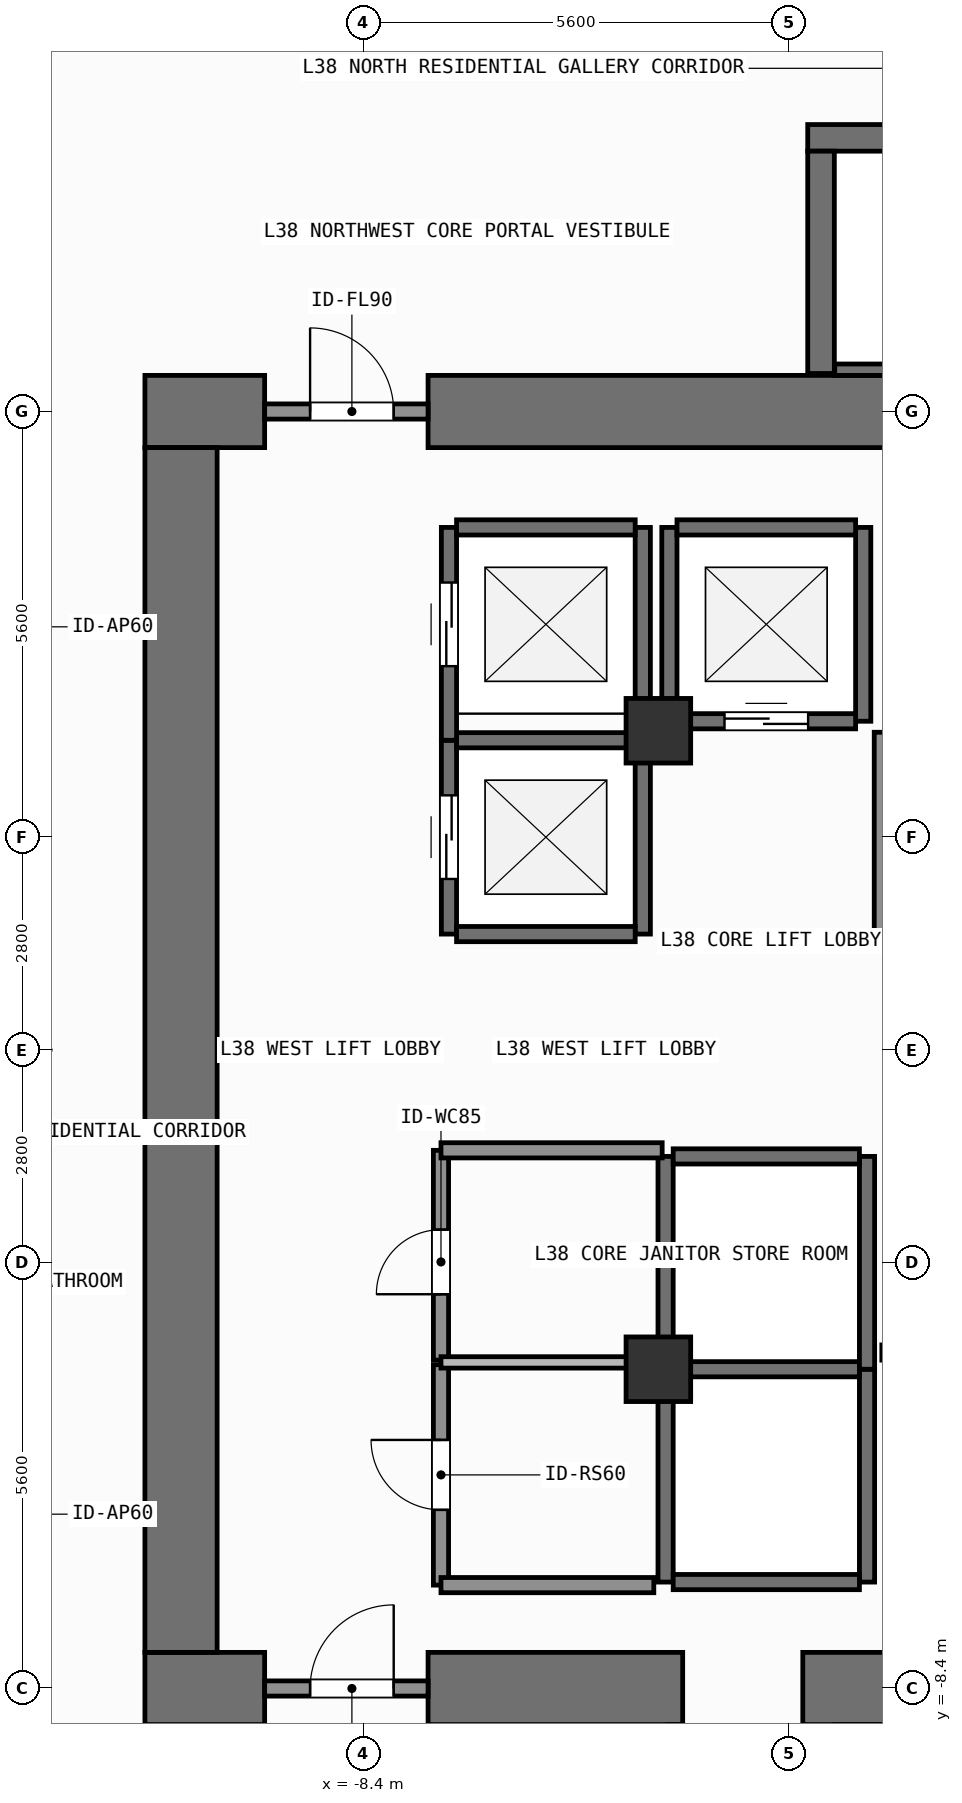
"""IFC4 building model, lengths in metres.
Left out: names, types, materials, properties, quantities, classifications, styles, units other than length and angle.
Written with IfcOpenShell. Run it as: python <this file> out.ifc"""

import sys

from ifc_helpers import new_model, si_unit, direction, frame, frame_2d, origin, origin_2d, place, context, subcontext, project, spatial, rectangle, extrude, element, fill, save


model = new_model("IFC4")
c1 = context("Model", 3, precision=1e-05, world=origin(), true_north=direction((0.0, 1.0)))
c2 = subcontext(c1, "Body", "Model", "MODEL_VIEW")
j1 = project(units=[si_unit("LENGTHUNIT", "METRE"), si_unit("PLANEANGLEUNIT", "RADIAN")], contexts=[c1])
p1 = place(None, origin())
s1 = spatial("IfcSite", under=j1, at=p1, CompositionType="ELEMENT")
p2 = place(p1, origin())
s2 = spatial("IfcBuilding", under=s1, at=p2, CompositionType="ELEMENT")
p3 = place(p2, frame((0.0, 0.0, 152.4)))
s3 = spatial("IfcBuildingStorey", under=s2, at=p3, CompositionType="ELEMENT", Elevation=152.4)
p4 = place(p3, frame((-11.275, -8.4, 0.0), z_axis=(0.0, 0.0, 1.0), x_axis=(1.0, 0.0, 0.0)))
e1 = element("IfcWall", 1, at=p4, inside=s3, PredefinedType="SHEAR", context=c2, shape_type="SweptSolid", body=[
    extrude(rectangle(XDim=1.575, YDim=0.95, at=frame_2d((0.788, 0.0))), origin(), (0.0, 0.0, 1.0), 3.9),
])
p5 = place(p3, frame((-7.55, -8.4, 0.0), z_axis=(0.0, 0.0, 1.0), x_axis=(1.0, 0.0, 0.0)))
e2 = element("IfcWall", 2, at=p5, inside=s3, PredefinedType="SHEAR", context=c2, shape_type="SweptSolid", body=[
    extrude(rectangle(XDim=3.35, YDim=0.95, at=frame_2d((1.675, 0.0))), origin(), (0.0, 0.0, 1.0), 3.9),
])
p6 = place(p3, frame((-2.62, -8.4, 0.0), z_axis=(0.0, 0.0, 1.0), x_axis=(1.0, 0.0, 0.0)))
e3 = element("IfcWall", 3, at=p6, inside=s3, PredefinedType="SHEAR", context=c2, shape_type="SweptSolid", body=[
    extrude(rectangle(XDim=7.27, YDim=0.95, at=frame_2d((3.635, 0.0))), origin(), (0.0, 0.0, 1.0), 3.9),
])
p7 = place(p3, frame((-11.275, 8.4, 0.0), z_axis=(0.0, 0.0, 1.0), x_axis=(1.0, 0.0, 0.0)))
e4 = element("IfcWall", 4, at=p7, inside=s3, PredefinedType="SHEAR", context=c2, shape_type="SweptSolid", body=[
    extrude(rectangle(XDim=1.575, YDim=0.95, at=frame_2d((0.788, 0.0))), origin(), (0.0, 0.0, 1.0), 3.9),
])
p8 = place(p3, frame((-7.55, 8.4, 0.0), z_axis=(0.0, 0.0, 1.0), x_axis=(1.0, 0.0, 0.0)))
e5 = element("IfcWall", 5, at=p8, inside=s3, PredefinedType="SHEAR", context=c2, shape_type="SweptSolid", body=[
    extrude(rectangle(XDim=16.425, YDim=0.95, at=frame_2d((8.212, 0.0))), origin(), (0.0, 0.0, 1.0), 3.9),
])
p9 = place(p3, frame((-10.8, -7.925, 0.0), z_axis=(0.0, 0.0, 1.0), x_axis=(0.0, 1.0, 0.0)))
e6 = element("IfcWall", 6, at=p9, inside=s3, PredefinedType="SHEAR", context=c2, shape_type="SweptSolid", body=[
    extrude(rectangle(XDim=15.85, YDim=0.95, at=frame_2d((7.925, 0.0))), origin(), (0.0, 0.0, 1.0), 3.9),
])
p10 = place(p3, frame((-2.555, 12.0, 0.0), z_axis=(0.0, 0.0, 1.0), x_axis=(1.0, 0.0, 0.0)))
e7 = element("IfcWall", 7, at=p10, inside=s3, PredefinedType="SHEAR", context=c2, shape_type="SweptSolid", body=[
    extrude(rectangle(XDim=7.31, YDim=0.35, at=frame_2d((3.655, 0.0))), origin(), (0.0, 0.0, 1.0), 3.9),
])
p11 = place(p3, frame((-2.2, 8.95, 0.0), z_axis=(0.0, 0.0, 1.0), x_axis=(1.0, 0.0, 0.0)))
e8 = element("IfcWall", 8, at=p11, inside=s3, PredefinedType="SHEAR", context=c2, shape_type="SweptSolid", body=[
    extrude(rectangle(XDim=6.6, YDim=0.15, at=frame_2d((3.3, 0.0))), origin(), (0.0, 0.0, 1.0), 3.9),
])
p12 = place(p3, frame((-2.38, 8.9, 0.0), z_axis=(0.0, 0.0, 1.0), x_axis=(0.0, 1.0, 0.0)))
e9 = element("IfcWall", 9, at=p12, inside=s3, PredefinedType="SHEAR", context=c2, shape_type="SweptSolid", body=[
    extrude(rectangle(XDim=2.925, YDim=0.35, at=frame_2d((1.462, 0.0))), origin(), (0.0, 0.0, 1.0), 3.9),
])
for number, where, z_axis, x_axis in (
    (10, (-4.52, -4.2, 0.0), (0.0, 0.0, 1.0), (1.0, 0.0, 0.0)),
    (11, (-4.52, 4.2, 0.0), (0.0, 0.0, 1.0), (1.0, 0.0, 0.0)),
):
    element("IfcColumn", number, at=place(p3, frame(where, z_axis=z_axis, x_axis=x_axis)), inside=s3, PredefinedType="COLUMN", context=c2, shape_type="SweptSolid", body=[
        extrude(rectangle(XDim=0.85, YDim=0.85, at=origin_2d()), origin(), (0.0, 0.0, 1.0), 3.9),
    ])
p13 = place(p3, frame((-7.275, 1.525, 0.0), z_axis=(0.0, 0.0, 1.0), x_axis=(0.0, 1.0, 0.0)))
e12 = element("IfcWall", 12, at=p13, inside=s3, PredefinedType="SHEAR", context=c2, shape_type="SweptSolid", body=[
    extrude(rectangle(XDim=2.55, YDim=0.2, at=frame_2d((1.275, 0.0))), origin(), (0.0, 0.0, 1.0), 3.6),
])
p14 = place(p13, frame((0.725, 0.0, 0.0)))
e13 = element("IfcOpeningElement", 13, at=p14, cuts=e12, PredefinedType="OPENING", context=c2, shape_type="SweptSolid", body=[
    extrude(rectangle(XDim=1.1, YDim=2.2, at=frame_2d((0.55, 1.1))), frame((0.0, 0.11, 0.0), z_axis=(0.0, -1.0, 0.0), x_axis=(1.0, 0.0, 0.0)), (0.0, 0.0, 1.0), 0.22),
])
p15 = place(p3, frame((-4.725, 1.525, 0.0), z_axis=(0.0, 0.0, 1.0), x_axis=(0.0, 1.0, 0.0)))
e14 = element("IfcWall", 14, at=p15, inside=s3, PredefinedType="SHEAR", context=c2, shape_type="SweptSolid", body=[
    extrude(rectangle(XDim=2.55, YDim=0.2, at=frame_2d((1.275, 0.0))), origin(), (0.0, 0.0, 1.0), 3.6),
])
for number, where, z_axis, x_axis in (
    (15, (-7.175, 1.525, 0.0), (0.0, 0.0, 1.0), (1.0, 0.0, 0.0)),
    (16, (-7.175, 4.075, 0.0), (0.0, 0.0, 1.0), (1.0, 0.0, 0.0)),
):
    element("IfcWall", number, at=place(p3, frame(where, z_axis=z_axis, x_axis=x_axis)), inside=s3, PredefinedType="SHEAR", context=c2, shape_type="SweptSolid", body=[
        extrude(rectangle(XDim=2.35, YDim=0.2, at=frame_2d((1.175, 0.0))), origin(), (0.0, 0.0, 1.0), 3.6),
    ])
p16 = place(p3, frame((-7.275, 4.075, 0.0), z_axis=(0.0, 0.0, 1.0), x_axis=(0.0, 1.0, 0.0)))
e17 = element("IfcWall", 17, at=p16, inside=s3, PredefinedType="SHEAR", context=c2, shape_type="SweptSolid", body=[
    extrude(rectangle(XDim=2.8, YDim=0.2, at=frame_2d((1.4, 0.0))), origin(), (0.0, 0.0, 1.0), 3.6),
])
p17 = place(p16, frame((0.975, 0.0, 0.0)))
e18 = element("IfcOpeningElement", 18, at=p17, cuts=e17, PredefinedType="OPENING", context=c2, shape_type="SweptSolid", body=[
    extrude(rectangle(XDim=1.1, YDim=2.2, at=frame_2d((0.55, 1.1))), frame((0.0, 0.11, 0.0), z_axis=(0.0, -1.0, 0.0), x_axis=(1.0, 0.0, 0.0)), (0.0, 0.0, 1.0), 0.22),
])
p18 = place(p3, frame((-4.725, 4.075, 0.0), z_axis=(0.0, 0.0, 1.0), x_axis=(0.0, 1.0, 0.0)))
e19 = element("IfcWall", 19, at=p18, inside=s3, PredefinedType="SHEAR", context=c2, shape_type="SweptSolid", body=[
    extrude(rectangle(XDim=2.8, YDim=0.2, at=frame_2d((1.4, 0.0))), origin(), (0.0, 0.0, 1.0), 3.6),
])
p19 = place(p3, frame((-7.175, 6.875, 0.0), z_axis=(0.0, 0.0, 1.0), x_axis=(1.0, 0.0, 0.0)))
e20 = element("IfcWall", 20, at=p19, inside=s3, PredefinedType="SHEAR", context=c2, shape_type="SweptSolid", body=[
    extrude(rectangle(XDim=2.35, YDim=0.2, at=frame_2d((1.175, 0.0))), origin(), (0.0, 0.0, 1.0), 3.6),
])
for number, where, z_axis, x_axis in (
    (21, (-4.375, 4.325, 0.0), (0.0, 0.0, 1.0), (0.0, 1.0, 0.0)),
    (22, (-1.825, 4.325, 0.0), (0.0, 0.0, 1.0), (0.0, 1.0, 0.0)),
):
    element("IfcWall", number, at=place(p3, frame(where, z_axis=z_axis, x_axis=x_axis)), inside=s3, PredefinedType="SHEAR", context=c2, shape_type="SweptSolid", body=[
        extrude(rectangle(XDim=2.55, YDim=0.2, at=frame_2d((1.275, 0.0))), origin(), (0.0, 0.0, 1.0), 3.6),
    ])
p20 = place(p3, frame((-4.275, 4.325, 0.0), z_axis=(0.0, 0.0, 1.0), x_axis=(1.0, 0.0, 0.0)))
e23 = element("IfcWall", 23, at=p20, inside=s3, PredefinedType="SHEAR", context=c2, shape_type="SweptSolid", body=[
    extrude(rectangle(XDim=2.35, YDim=0.2, at=frame_2d((1.175, 0.0))), origin(), (0.0, 0.0, 1.0), 3.6),
])
p21 = place(p20, frame((0.625, 0.0, 0.0)))
e24 = element("IfcOpeningElement", 24, at=p21, cuts=e23, PredefinedType="OPENING", context=c2, shape_type="SweptSolid", body=[
    extrude(rectangle(XDim=1.1, YDim=2.2, at=frame_2d((0.55, 1.1))), frame((0.0, 0.11, 0.0), z_axis=(0.0, -1.0, 0.0), x_axis=(1.0, 0.0, 0.0)), (0.0, 0.0, 1.0), 0.22),
])
p22 = place(p3, frame((-4.275, 6.875, 0.0), z_axis=(0.0, 0.0, 1.0), x_axis=(1.0, 0.0, 0.0)))
e25 = element("IfcWall", 25, at=p22, inside=s3, PredefinedType="SHEAR", context=c2, shape_type="SweptSolid", body=[
    extrude(rectangle(XDim=2.35, YDim=0.2, at=frame_2d((1.175, 0.0))), origin(), (0.0, 0.0, 1.0), 3.6),
])
for number, where, z_axis, x_axis in (
    (26, (-4.425, -7.0, 0.0), (0.0, 0.0, 1.0), (0.0, 1.0, 0.0)),
    (27, (-1.775, -7.0, 0.0), (0.0, 0.0, 1.0), (0.0, 1.0, 0.0)),
):
    element("IfcWall", number, at=place(p3, frame(where, z_axis=z_axis, x_axis=x_axis)), inside=s3, PredefinedType="SHEAR", context=c2, shape_type="SweptSolid", body=[
        extrude(rectangle(XDim=2.8, YDim=0.2, at=frame_2d((1.4, 0.0))), origin(), (0.0, 0.0, 1.0), 3.6),
    ])
for number, where, z_axis, x_axis in (
    (28, (-4.325, -7.0, 0.0), (0.0, 0.0, 1.0), (1.0, 0.0, 0.0)),
    (29, (-4.325, -4.2, 0.0), (0.0, 0.0, 1.0), (1.0, 0.0, 0.0)),
):
    element("IfcWall", number, at=place(p3, frame(where, z_axis=z_axis, x_axis=x_axis)), inside=s3, PredefinedType="SHEAR", context=c2, shape_type="SweptSolid", body=[
        extrude(rectangle(XDim=2.45, YDim=0.2, at=frame_2d((1.225, 0.0))), origin(), (0.0, 0.0, 1.0), 3.6),
    ])
for number, where, z_axis, x_axis in (
    (30, (-4.425, -4.2, 0.0), (0.0, 0.0, 1.0), (0.0, 1.0, 0.0)),
    (31, (-1.775, -4.2, 0.0), (0.0, 0.0, 1.0), (0.0, 1.0, 0.0)),
):
    element("IfcWall", number, at=place(p3, frame(where, z_axis=z_axis, x_axis=x_axis)), inside=s3, PredefinedType="SHEAR", context=c2, shape_type="SweptSolid", body=[
        extrude(rectangle(XDim=2.8, YDim=0.2, at=frame_2d((1.4, 0.0))), origin(), (0.0, 0.0, 1.0), 3.6),
    ])
p23 = place(p3, frame((-4.325, -1.4, 0.0), z_axis=(0.0, 0.0, 1.0), x_axis=(1.0, 0.0, 0.0)))
e32 = element("IfcWall", 32, at=p23, inside=s3, PredefinedType="SHEAR", context=c2, shape_type="SweptSolid", body=[
    extrude(rectangle(XDim=2.45, YDim=0.2, at=frame_2d((1.225, 0.0))), origin(), (0.0, 0.0, 1.0), 3.6),
])
p24 = place(p3, frame((-9.7, -8.4, 0.0), z_axis=(0.0, 0.0, 1.0), x_axis=(1.0, 0.0, 0.0)))
e33 = element("IfcWall", 33, at=p24, inside=s3, PredefinedType="SOLIDWALL", context=c2, shape_type="SweptSolid", body=[
    extrude(rectangle(XDim=2.15, YDim=0.2, at=frame_2d((1.075, 0.0))), origin(), (0.0, 0.0, 1.0), 2.64),
])
p25 = place(p24, frame((0.598, 0.0, 0.0)))
e34 = element("IfcOpeningElement", 34, at=p25, cuts=e33, PredefinedType="OPENING", context=c2, shape_type="SweptSolid", body=[
    extrude(rectangle(XDim=1.1, YDim=2.15, at=frame_2d((0.55, 1.075))), frame((0.0, 0.11, 0.0), z_axis=(0.0, -1.0, 0.0), x_axis=(1.0, 0.0, 0.0)), (0.0, 0.0, 1.0), 0.22),
])
p26 = place(p3, frame((-9.7, 8.4, 0.0), z_axis=(0.0, 0.0, 1.0), x_axis=(1.0, 0.0, 0.0)))
e35 = element("IfcWall", 35, at=p26, inside=s3, PredefinedType="SOLIDWALL", context=c2, shape_type="SweptSolid", body=[
    extrude(rectangle(XDim=2.15, YDim=0.2, at=frame_2d((1.075, 0.0))), origin(), (0.0, 0.0, 1.0), 2.64),
])
p27 = place(p26, frame((0.598, 0.0, 0.0)))
e36 = element("IfcOpeningElement", 36, at=p27, cuts=e35, PredefinedType="OPENING", context=c2, shape_type="SweptSolid", body=[
    extrude(rectangle(XDim=1.1, YDim=2.15, at=frame_2d((0.55, 1.075))), frame((0.0, 0.11, 0.0), z_axis=(0.0, -1.0, 0.0), x_axis=(1.0, 0.0, 0.0)), (0.0, 0.0, 1.0), 0.22),
])
p28 = place(p3, frame((-7.38, -7.04, 0.0), z_axis=(0.0, 0.0, 1.0), x_axis=(0.0, 1.0, 0.0)))
e37 = element("IfcWall", 37, at=p28, inside=s3, PredefinedType="SOLIDWALL", context=c2, shape_type="SweptSolid", body=[
    extrude(rectangle(XDim=2.9, YDim=0.2, at=frame_2d((1.45, 0.0))), origin(), (0.0, 0.0, 1.0), 3.6),
])
p29 = place(p28, frame((0.99, 0.0, 0.0)))
e38 = element("IfcOpeningElement", 38, at=p29, cuts=e37, PredefinedType="OPENING", context=c2, shape_type="SweptSolid", body=[
    extrude(rectangle(XDim=0.92, YDim=2.1, at=frame_2d((0.46, 1.05))), frame((0.0, 0.11, 0.0), z_axis=(0.0, -1.0, 0.0), x_axis=(1.0, 0.0, 0.0)), (0.0, 0.0, 1.0), 0.22),
])
p30 = place(p3, frame((-7.38, -4.08, 0.0), z_axis=(0.0, 0.0, 1.0), x_axis=(0.0, 1.0, 0.0)))
e39 = element("IfcWall", 39, at=p30, inside=s3, PredefinedType="SOLIDWALL", context=c2, shape_type="SweptSolid", body=[
    extrude(rectangle(XDim=2.76, YDim=0.2, at=frame_2d((1.38, 0.0))), origin(), (0.0, 0.0, 1.0), 3.6),
])
p31 = place(p30, frame((0.867, 0.0, 0.0)))
e40 = element("IfcOpeningElement", 40, at=p31, cuts=e39, PredefinedType="OPENING", context=c2, shape_type="SweptSolid", body=[
    extrude(rectangle(XDim=0.85, YDim=2.1, at=frame_2d((0.425, 1.05))), frame((0.0, 0.11, 0.0), z_axis=(0.0, -1.0, 0.0), x_axis=(1.0, 0.0, 0.0)), (0.0, 0.0, 1.0), 0.22),
])
p32 = place(p3, frame((-7.38, -1.32, 0.0), z_axis=(0.0, 0.0, 1.0), x_axis=(1.0, 0.0, 0.0)))
e41 = element("IfcWall", 41, at=p32, inside=s3, PredefinedType="SOLIDWALL", context=c2, shape_type="SweptSolid", body=[
    extrude(rectangle(XDim=2.91, YDim=0.2, at=frame_2d((1.455, 0.0))), origin(), (0.0, 0.0, 1.0), 3.6),
])
p33 = place(p3, frame((-1.58, 1.48, 0.0), z_axis=(0.0, 0.0, 1.0), x_axis=(0.0, 1.0, 0.0)))
e42 = element("IfcWall", 42, at=p33, inside=s3, PredefinedType="SOLIDWALL", context=c2, shape_type="SweptSolid", body=[
    extrude(rectangle(XDim=2.7, YDim=0.2, at=frame_2d((1.35, 0.0))), origin(), (0.0, 0.0, 1.0), 3.6),
])
p34 = place(p3, frame((-7.38, -7.04, 0.0), z_axis=(0.0, 0.0, 1.0), x_axis=(1.0, 0.0, 0.0)))
e43 = element("IfcWall", 43, at=p34, inside=s3, PredefinedType="SOLIDWALL", context=c2, shape_type="SweptSolid", body=[
    extrude(rectangle(XDim=2.8, YDim=0.2, at=frame_2d((1.4, 0.0))), origin(), (0.0, 0.0, 1.0), 3.6),
])
p35 = place(p3, frame((-7.38, -4.11, 0.0), z_axis=(0.0, 0.0, 1.0), x_axis=(1.0, 0.0, 0.0)))
e44 = element("IfcWall", 44, at=p35, inside=s3, PredefinedType="PARTITIONING", context=c2, shape_type="SweptSolid", body=[
    extrude(rectangle(XDim=2.8, YDim=0.15, at=frame_2d((1.4, 0.0))), origin(), (0.0, 0.0, 1.0), 3.6),
])
p36 = place(p14, origin())
e45 = element("IfcDoor", 45, at=p36, inside=s3, OperationType="SLIDING_TO_LEFT", PredefinedType="DOOR", context=c2, shape_type="SweptSolid", body=[
    extrude(rectangle(XDim=1.1, YDim=2.2, at=frame_2d((0.55, 1.1))), frame((0.0, 0.025, 0.0), z_axis=(0.0, -1.0, 0.0), x_axis=(1.0, 0.0, 0.0)), (0.0, 0.0, 1.0), 0.05),
])
fill(e13, e45)
p37 = place(p17, origin())
e46 = element("IfcDoor", 46, at=p37, inside=s3, OperationType="SLIDING_TO_LEFT", PredefinedType="DOOR", context=c2, shape_type="SweptSolid", body=[
    extrude(rectangle(XDim=1.1, YDim=2.2, at=frame_2d((0.55, 1.1))), frame((0.0, 0.025, 0.0), z_axis=(0.0, -1.0, 0.0), x_axis=(1.0, 0.0, 0.0)), (0.0, 0.0, 1.0), 0.05),
])
fill(e18, e46)
p38 = place(p21, origin())
e47 = element("IfcDoor", 47, at=p38, inside=s3, OperationType="SLIDING_TO_LEFT", PredefinedType="DOOR", context=c2, shape_type="SweptSolid", body=[
    extrude(rectangle(XDim=1.1, YDim=2.2, at=frame_2d((0.55, 1.1))), frame((0.0, 0.025, 0.0), z_axis=(0.0, -1.0, 0.0), x_axis=(1.0, 0.0, 0.0)), (0.0, 0.0, 1.0), 0.05),
])
fill(e24, e47)
p39 = place(p25, origin())
e48 = element("IfcDoor", 48, at=p39, inside=s3, OperationType="SINGLE_SWING_RIGHT", PredefinedType="DOOR", context=c2, shape_type="SweptSolid", body=[
    extrude(rectangle(XDim=1.1, YDim=2.15, at=frame_2d((0.55, 1.075))), frame((0.0, 0.025, 0.0), z_axis=(0.0, -1.0, 0.0), x_axis=(1.0, 0.0, 0.0)), (0.0, 0.0, 1.0), 0.05),
])
fill(e34, e48)
p40 = place(p27, origin())
e49 = element("IfcDoor", 49, at=p40, inside=s3, OperationType="SINGLE_SWING_LEFT", PredefinedType="DOOR", context=c2, shape_type="SweptSolid", body=[
    extrude(rectangle(XDim=1.1, YDim=2.15, at=frame_2d((0.55, 1.075))), frame((0.0, 0.025, 0.0), z_axis=(0.0, -1.0, 0.0), x_axis=(1.0, 0.0, 0.0)), (0.0, 0.0, 1.0), 0.05),
])
fill(e36, e49)
p41 = place(p29, origin())
e50 = element("IfcDoor", 50, at=p41, inside=s3, OperationType="SINGLE_SWING_RIGHT", PredefinedType="DOOR", context=c2, shape_type="SweptSolid", body=[
    extrude(rectangle(XDim=0.92, YDim=2.1, at=frame_2d((0.46, 1.05))), frame((0.0, 0.025, 0.0), z_axis=(0.0, -1.0, 0.0), x_axis=(1.0, 0.0, 0.0)), (0.0, 0.0, 1.0), 0.05),
])
fill(e38, e50)
p42 = place(p31, origin())
e51 = element("IfcDoor", 51, at=p42, inside=s3, OperationType="SINGLE_SWING_LEFT", PredefinedType="DOOR", context=c2, shape_type="SweptSolid", body=[
    extrude(rectangle(XDim=0.85, YDim=2.1, at=frame_2d((0.425, 1.05))), frame((0.0, 0.025, 0.0), z_axis=(0.0, -1.0, 0.0), x_axis=(1.0, 0.0, 0.0)), (0.0, 0.0, 1.0), 0.05),
])
fill(e40, e51)
save(model, sys.argv[1])
